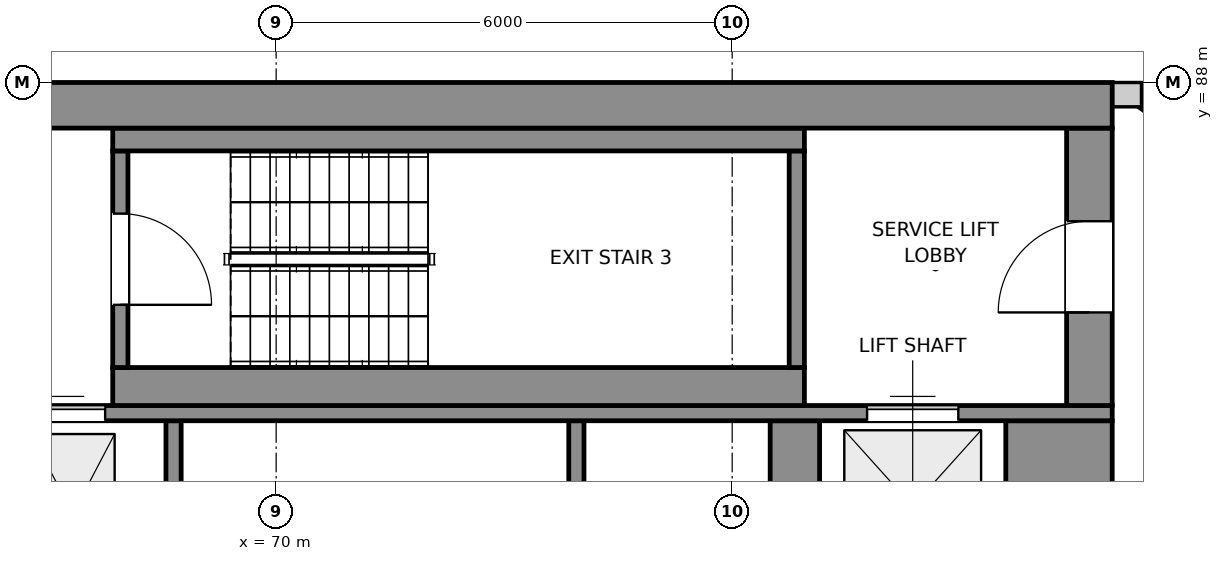
"""IFC4 building model, lengths in metres.
Left out: names, types, materials, properties, quantities, classifications, styles, units other than length and angle.
Written with IfcOpenShell. Run it as: python <this file> out.ifc"""

import sys

from ifc_helpers import new_model, si_unit, direction, frame, frame_2d, origin, place, context, subcontext, project, spatial, rectangle, extrude, element, fill, save


model = new_model("IFC4")
c1 = context("Model", 3, precision=1e-05, world=origin(), true_north=direction((0.0, 1.0)))
c2 = subcontext(c1, "Body", "Model", "MODEL_VIEW")
j1 = project(units=[si_unit("LENGTHUNIT", "METRE"), si_unit("PLANEANGLEUNIT", "RADIAN")], contexts=[c1])
p1 = place(None, origin())
s1 = spatial("IfcSite", under=j1, at=p1, CompositionType="ELEMENT")
p2 = place(p1, origin())
s2 = spatial("IfcBuilding", under=s1, at=p2, CompositionType="ELEMENT")
p3 = place(p2, frame((0.0, 0.0, 313.9)))
s3 = spatial("IfcBuildingStorey", under=s2, at=p3, CompositionType="ELEMENT", Elevation=313.9)
p4 = place(p3, frame((86.702, 83.977, 0.0), z_axis=(0.0, 0.0, 1.0), x_axis=(-0.809010691028, 0.587793928007, 0.0)))
e1 = element("IfcWall", 1, at=p4, inside=s3, PredefinedType="SOLIDWALL", context=c2, shape_type="SweptSolid", body=[
    extrude(rectangle(XDim=6.572, YDim=0.32, at=frame_2d((3.286, 0.0))), origin(), (0.0, 0.0, 1.0), 3.6),
])
p5 = place(p4, frame((1.986, 0.0, 0.75)))
e2 = element("IfcOpeningElement", 2, at=p5, cuts=e1, PredefinedType="OPENING", context=c2, shape_type="SweptSolid", body=[
    extrude(rectangle(XDim=2.1, YDim=2.1, at=frame_2d((1.05, 1.05))), frame((0.0, 0.17, 0.0), z_axis=(0.0, -1.0, 0.0), x_axis=(1.0, 0.0, 0.0)), (0.0, 0.0, 1.0), 0.34),
])
p6 = place(p3, frame((81.385, 87.84, 0.0), z_axis=(0.0, 0.0, 1.0), x_axis=(-1.0, 0.0, 0.0)))
e3 = element("IfcWall", 3, at=p6, inside=s3, PredefinedType="SOLIDWALL", context=c2, shape_type="SweptSolid", body=[
    extrude(rectangle(XDim=0.385, YDim=0.32, at=frame_2d((0.192, 0.0))), origin(), (0.0, 0.0, 1.0), 3.6),
])
for number, where, z_axis, x_axis in (
    (4, (68.65, 81.1, 0.0), (0.0, 0.0, 1.0), (0.0, 1.0, 0.0)),
    (5, (73.95, 81.1, 0.0), (0.0, 0.0, 1.0), (0.0, 1.0, 0.0)),
):
    element("IfcWall", number, at=place(p3, frame(where, z_axis=z_axis, x_axis=x_axis)), inside=s3, PredefinedType="SHEAR", context=c2, shape_type="SweptSolid", body=[
        extrude(rectangle(XDim=2.45, YDim=0.2, at=frame_2d((1.225, 0.0))), origin(), (0.0, 0.0, 1.0), 3.9),
    ])
p7 = place(p3, frame((76.825, 81.3, 0.0), z_axis=(0.0, 0.0, 1.0), x_axis=(0.0, 1.0, 0.0)))
e6 = element("IfcWall", 6, at=p7, inside=s3, PredefinedType="SHEAR", context=c2, shape_type="SweptSolid", body=[
    extrude(rectangle(XDim=2.25, YDim=0.65, at=frame_2d((1.125, 0.0))), origin(), (0.0, 0.0, 1.0), 3.9),
])
p8 = place(p3, frame((80.3, 81.3, 0.0), z_axis=(0.0, 0.0, 1.0), x_axis=(0.0, 1.0, 0.0)))
e7 = element("IfcWall", 7, at=p8, inside=s3, PredefinedType="SHEAR", context=c2, shape_type="SweptSolid", body=[
    extrude(rectangle(XDim=2.25, YDim=1.4, at=frame_2d((1.125, 0.0))), origin(), (0.0, 0.0, 1.0), 3.9),
])
p9 = place(p3, frame((59.0, 83.65, 0.0), z_axis=(0.0, 0.0, 1.0), x_axis=(1.0, 0.0, 0.0)))
e8 = element("IfcWall", 8, at=p9, inside=s3, PredefinedType="SHEAR", context=c2, shape_type="SweptSolid", body=[
    extrude(rectangle(XDim=22.0, YDim=0.2, at=frame_2d((11.0, 0.0))), origin(), (0.0, 0.0, 1.0), 3.9),
])
p10 = place(p9, frame((5.125, 0.0, 0.0)))
e9 = element("IfcOpeningElement", 9, at=p10, cuts=e8, PredefinedType="OPENING", context=c2, shape_type="SweptSolid", body=[
    extrude(rectangle(XDim=1.1, YDim=2.1, at=frame_2d((0.55, 1.05))), frame((0.0, 0.11, 0.0), z_axis=(0.0, -1.0, 0.0), x_axis=(1.0, 0.0, 0.0)), (0.0, 0.0, 1.0), 0.22),
])
p11 = place(p9, frame((7.65, 0.0, 0.0)))
e10 = element("IfcOpeningElement", 10, at=p11, cuts=e8, PredefinedType="OPENING", context=c2, shape_type="SweptSolid", body=[
    extrude(rectangle(XDim=1.1, YDim=2.1, at=frame_2d((0.55, 1.05))), frame((0.0, 0.11, 0.0), z_axis=(0.0, -1.0, 0.0), x_axis=(1.0, 0.0, 0.0)), (0.0, 0.0, 1.0), 0.22),
])
p12 = place(p9, frame((18.775, 0.0, 0.0)))
e11 = element("IfcOpeningElement", 11, at=p12, cuts=e8, PredefinedType="OPENING", context=c2, shape_type="SweptSolid", body=[
    extrude(rectangle(XDim=1.2, YDim=2.1, at=frame_2d((0.6, 1.05))), frame((0.0, 0.11, 0.0), z_axis=(0.0, -1.0, 0.0), x_axis=(1.0, 0.0, 0.0)), (0.0, 0.0, 1.0), 0.22),
])
p13 = place(p9, frame((2.075, 0.0, 0.0)))
e12 = element("IfcOpeningElement", 12, at=p13, cuts=e8, PredefinedType="OPENING", context=c2, shape_type="SweptSolid", body=[
    extrude(rectangle(XDim=1.1, YDim=2.1, at=frame_2d((0.55, 1.05))), frame((0.0, 0.11, 0.0), z_axis=(0.0, -1.0, 0.0), x_axis=(1.0, 0.0, 0.0)), (0.0, 0.0, 1.0), 0.22),
])
p14 = place(p3, frame((67.85, 84.0, 0.0), z_axis=(0.0, 0.0, 1.0), x_axis=(1.0, 0.0, 0.0)))
e13 = element("IfcWall", 13, at=p14, inside=s3, PredefinedType="SHEAR", context=c2, shape_type="SweptSolid", body=[
    extrude(rectangle(XDim=9.1, YDim=0.5, at=frame_2d((4.55, 0.0))), origin(), (0.0, 0.0, 1.0), 3.9),
])
p15 = place(p3, frame((80.7, 83.75, 0.0), z_axis=(0.0, 0.0, 1.0), x_axis=(0.0, 1.0, 0.0)))
e14 = element("IfcWall", 14, at=p15, inside=s3, PredefinedType="SHEAR", context=c2, shape_type="SweptSolid", body=[
    extrude(rectangle(XDim=3.65, YDim=0.6, at=frame_2d((1.825, 0.0))), origin(), (0.0, 0.0, 1.0), 3.9),
])
p16 = place(p15, frame((1.225, 0.0, 0.0)))
e15 = element("IfcOpeningElement", 15, at=p16, cuts=e14, PredefinedType="OPENING", context=c2, shape_type="SweptSolid", body=[
    extrude(rectangle(XDim=1.2, YDim=2.1, at=frame_2d((0.6, 1.05))), frame((0.0, 0.31, 0.0), z_axis=(0.0, -1.0, 0.0), x_axis=(1.0, 0.0, 0.0)), (0.0, 0.0, 1.0), 0.62),
])
p17 = place(p3, frame((67.95, 84.25, 0.0), z_axis=(0.0, 0.0, 1.0), x_axis=(0.0, 1.0, 0.0)))
e16 = element("IfcWall", 16, at=p17, inside=s3, PredefinedType="SHEAR", context=c2, shape_type="SweptSolid", body=[
    extrude(rectangle(XDim=2.85, YDim=0.2, at=frame_2d((1.425, 0.0))), origin(), (0.0, 0.0, 1.0), 3.9),
])
p18 = place(p17, frame((0.825, 0.0, 0.0)))
e17 = element("IfcOpeningElement", 17, at=p18, cuts=e16, PredefinedType="OPENING", context=c2, shape_type="SweptSolid", body=[
    extrude(rectangle(XDim=1.2, YDim=2.1, at=frame_2d((0.6, 1.05))), frame((0.0, 0.11, 0.0), z_axis=(0.0, -1.0, 0.0), x_axis=(1.0, 0.0, 0.0)), (0.0, 0.0, 1.0), 0.22),
])
p19 = place(p3, frame((76.85, 84.25, 0.0), z_axis=(0.0, 0.0, 1.0), x_axis=(0.0, 1.0, 0.0)))
e18 = element("IfcWall", 18, at=p19, inside=s3, PredefinedType="SHEAR", context=c2, shape_type="SweptSolid", body=[
    extrude(rectangle(XDim=2.85, YDim=0.2, at=frame_2d((1.425, 0.0))), origin(), (0.0, 0.0, 1.0), 3.9),
])
p20 = place(p3, frame((67.85, 87.25, 0.0), z_axis=(0.0, 0.0, 1.0), x_axis=(1.0, 0.0, 0.0)))
e19 = element("IfcWall", 19, at=p20, inside=s3, PredefinedType="SHEAR", context=c2, shape_type="SweptSolid", body=[
    extrude(rectangle(XDim=9.1, YDim=0.3, at=frame_2d((4.55, 0.0))), origin(), (0.0, 0.0, 1.0), 3.9),
])
p21 = place(p3, frame((59.0, 87.7, 0.0), z_axis=(0.0, 0.0, 1.0), x_axis=(1.0, 0.0, 0.0)))
e20 = element("IfcWall", 20, at=p21, inside=s3, PredefinedType="SHEAR", context=c2, shape_type="SweptSolid", body=[
    extrude(rectangle(XDim=22.0, YDim=0.6, at=frame_2d((11.0, 0.0))), origin(), (0.0, 0.0, 1.0), 3.9),
])
p22 = place(p18, frame((1.2, 0.0, 0.0), z_axis=(0.0, 0.0, 1.0), x_axis=(-1.0, 0.0, 0.0)))
e21 = element("IfcDoor", 21, at=p22, inside=s3, OperationType="SINGLE_SWING_RIGHT", PredefinedType="DOOR", context=c2, shape_type="SweptSolid", body=[
    extrude(rectangle(XDim=1.2, YDim=2.1, at=frame_2d((0.6, 1.05))), frame((0.0, 0.025, 0.0), z_axis=(0.0, -1.0, 0.0), x_axis=(1.0, 0.0, 0.0)), (0.0, 0.0, 1.0), 0.05),
])
fill(e17, e21)
p23 = place(p16, origin())
e22 = element("IfcDoor", 22, at=p23, inside=s3, OperationType="SINGLE_SWING_LEFT", PredefinedType="DOOR", context=c2, shape_type="SweptSolid", body=[
    extrude(rectangle(XDim=1.2, YDim=2.1, at=frame_2d((0.6, 1.05))), frame((0.0, 0.025, 0.0), z_axis=(0.0, -1.0, 0.0), x_axis=(1.0, 0.0, 0.0)), (0.0, 0.0, 1.0), 0.05),
])
fill(e15, e22)
p24 = place(p11, origin())
e23 = element("IfcDoor", 23, at=p24, inside=s3, OperationType="DOUBLE_DOOR_SLIDING", PredefinedType="DOOR", context=c2, shape_type="SweptSolid", body=[
    extrude(rectangle(XDim=1.1, YDim=2.1, at=frame_2d((0.55, 1.05))), frame((0.0, 0.025, 0.0), z_axis=(0.0, -1.0, 0.0), x_axis=(1.0, 0.0, 0.0)), (0.0, 0.0, 1.0), 0.05),
])
fill(e10, e23)
p25 = place(p12, origin())
e24 = element("IfcDoor", 24, at=p25, inside=s3, OperationType="DOUBLE_DOOR_SLIDING", PredefinedType="DOOR", context=c2, shape_type="SweptSolid", body=[
    extrude(rectangle(XDim=1.2, YDim=2.1, at=frame_2d((0.6, 1.05))), frame((0.0, 0.025, 0.0), z_axis=(0.0, -1.0, 0.0), x_axis=(1.0, 0.0, 0.0)), (0.0, 0.0, 1.0), 0.05),
])
fill(e11, e24)
save(model, sys.argv[1])
